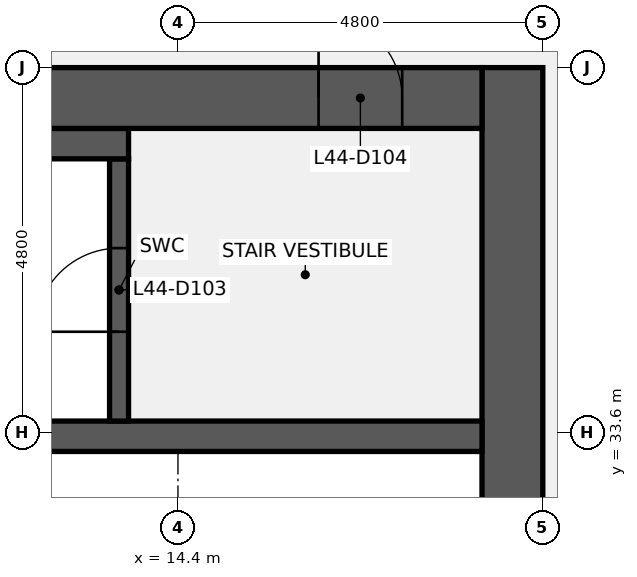
"""IFC4 building model, lengths in metres.
Left out: names, types, materials, properties, quantities, classifications, styles, units other than length and angle.
Written with IfcOpenShell. Run it as: python <this file> out.ifc"""

import sys

from ifc_helpers import new_model, si_unit, direction, frame, frame_2d, origin, place, context, subcontext, project, spatial, rectangle, extrude, element, fill, save


model = new_model("IFC4")
c1 = context("Model", 3, precision=1e-05, world=origin(), true_north=direction((0.0, 1.0)))
c2 = subcontext(c1, "Body", "Model", "MODEL_VIEW")
j1 = project(units=[si_unit("LENGTHUNIT", "METRE"), si_unit("PLANEANGLEUNIT", "RADIAN")], contexts=[c1])
p1 = place(None, origin())
s1 = spatial("IfcSite", under=j1, at=p1, CompositionType="ELEMENT")
p2 = place(p1, origin())
s2 = spatial("IfcBuilding", under=s1, at=p2, CompositionType="ELEMENT")
p3 = place(p2, frame((0.0, 0.0, 205.2)))
s3 = spatial("IfcBuildingStorey", under=s2, at=p3, CompositionType="ELEMENT", Elevation=205.2)
p4 = place(p3, frame((18.8, 38.4, 0.0), z_axis=(0.0, 0.0, 1.0), x_axis=(0.0, -1.0, 0.0)))
e1 = element("IfcWall", 1, at=p4, inside=s3, PredefinedType="SHEAR", context=c2, shape_type="SweptSolid", body=[
    extrude(rectangle(XDim=28.8, YDim=0.8, at=frame_2d((14.4, 0.0))), origin(), (0.0, 0.0, 1.0), 3.84),
])
p5 = place(p4, frame((18.3, 0.0, 0.0)))
e2 = element("IfcOpeningElement", 2, at=p5, cuts=e1, PredefinedType="OPENING", context=c2, shape_type="SweptSolid", body=[
    extrude(rectangle(XDim=1.8, YDim=2.1, at=frame_2d((0.9, 1.05))), frame((0.0, 0.41, 0.0), z_axis=(0.0, -1.0, 0.0), x_axis=(1.0, 0.0, 0.0)), (0.0, 0.0, 1.0), 0.82),
])
p6 = place(p4, frame((8.7, 0.0, 0.0)))
e3 = element("IfcOpeningElement", 3, at=p6, cuts=e1, PredefinedType="OPENING", context=c2, shape_type="SweptSolid", body=[
    extrude(rectangle(XDim=1.8, YDim=2.1, at=frame_2d((0.9, 1.05))), frame((0.0, 0.41, 0.0), z_axis=(0.0, -1.0, 0.0), x_axis=(1.0, 0.0, 0.0)), (0.0, 0.0, 1.0), 0.82),
])
p7 = place(p3, frame((0.8, 33.55, 0.0), z_axis=(0.0, 0.0, 1.0), x_axis=(1.0, 0.0, 0.0)))
e4 = element("IfcWall", 4, at=p7, inside=s3, PredefinedType="SHEAR", context=c2, shape_type="SweptSolid", body=[
    extrude(rectangle(XDim=17.6, YDim=0.4, at=frame_2d((8.8, 0.0))), origin(), (0.0, 0.0, 1.0), 3.84),
])
p8 = place(p3, frame((13.625, 33.75, 0.0), z_axis=(0.0, 0.0, 1.0), x_axis=(0.0, 1.0, 0.0)))
e5 = element("IfcWall", 5, at=p8, inside=s3, PredefinedType="SHEAR", context=c2, shape_type="SweptSolid", body=[
    extrude(rectangle(XDim=3.45, YDim=0.25, at=frame_2d((1.725, 0.0))), origin(), (0.0, 0.0, 1.0), 3.84),
])
p9 = place(p8, frame((1.175, 0.0, 0.0)))
e6 = element("IfcOpeningElement", 6, at=p9, cuts=e5, PredefinedType="OPENING", context=c2, shape_type="SweptSolid", body=[
    extrude(rectangle(XDim=1.1, YDim=2.1, at=frame_2d((0.55, 1.05))), frame((0.0, 0.135, 0.0), z_axis=(0.0, -1.0, 0.0), x_axis=(1.0, 0.0, 0.0)), (0.0, 0.0, 1.0), 0.27),
])
p10 = place(p3, frame((9.6, 37.4, 0.0), z_axis=(0.0, 0.0, 1.0), x_axis=(1.0, 0.0, 0.0)))
e7 = element("IfcWall", 7, at=p10, inside=s3, PredefinedType="SHEAR", context=c2, shape_type="SweptSolid", body=[
    extrude(rectangle(XDim=4.15, YDim=0.4, at=frame_2d((2.075, 0.0))), origin(), (0.0, 0.0, 1.0), 3.84),
])
p11 = place(p3, frame((9.6, 38.0, 0.0), z_axis=(0.0, 0.0, 1.0), x_axis=(1.0, 0.0, 0.0)))
e8 = element("IfcWall", 8, at=p11, inside=s3, PredefinedType="SHEAR", context=c2, shape_type="SweptSolid", body=[
    extrude(rectangle(XDim=8.8, YDim=0.8, at=frame_2d((4.4, 0.0))), origin(), (0.0, 0.0, 1.0), 3.84),
])
p12 = place(p11, frame((6.65, 0.0, 0.0)))
e9 = element("IfcOpeningElement", 9, at=p12, cuts=e8, PredefinedType="OPENING", context=c2, shape_type="SweptSolid", body=[
    extrude(rectangle(XDim=1.1, YDim=2.1, at=frame_2d((0.55, 1.05))), frame((0.0, 0.41, 0.0), z_axis=(0.0, -1.0, 0.0), x_axis=(1.0, 0.0, 0.0)), (0.0, 0.0, 1.0), 0.82),
])
p13 = place(p9, origin())
e10 = element("IfcDoor", 10, at=p13, inside=s3, OperationType="SINGLE_SWING_LEFT", PredefinedType="DOOR", context=c2, shape_type="SweptSolid", body=[
    extrude(rectangle(XDim=1.1, YDim=2.1, at=frame_2d((0.55, 1.05))), frame((0.0, 0.025, 0.0), z_axis=(0.0, -1.0, 0.0), x_axis=(1.0, 0.0, 0.0)), (0.0, 0.0, 1.0), 0.05),
])
fill(e6, e10)
p14 = place(p12, origin())
e11 = element("IfcDoor", 11, at=p14, inside=s3, OperationType="SINGLE_SWING_LEFT", PredefinedType="DOOR", context=c2, shape_type="SweptSolid", body=[
    extrude(rectangle(XDim=1.1, YDim=2.1, at=frame_2d((0.55, 1.05))), frame((0.0, 0.025, 0.0), z_axis=(0.0, -1.0, 0.0), x_axis=(1.0, 0.0, 0.0)), (0.0, 0.0, 1.0), 0.05),
])
fill(e9, e11)
save(model, sys.argv[1])
